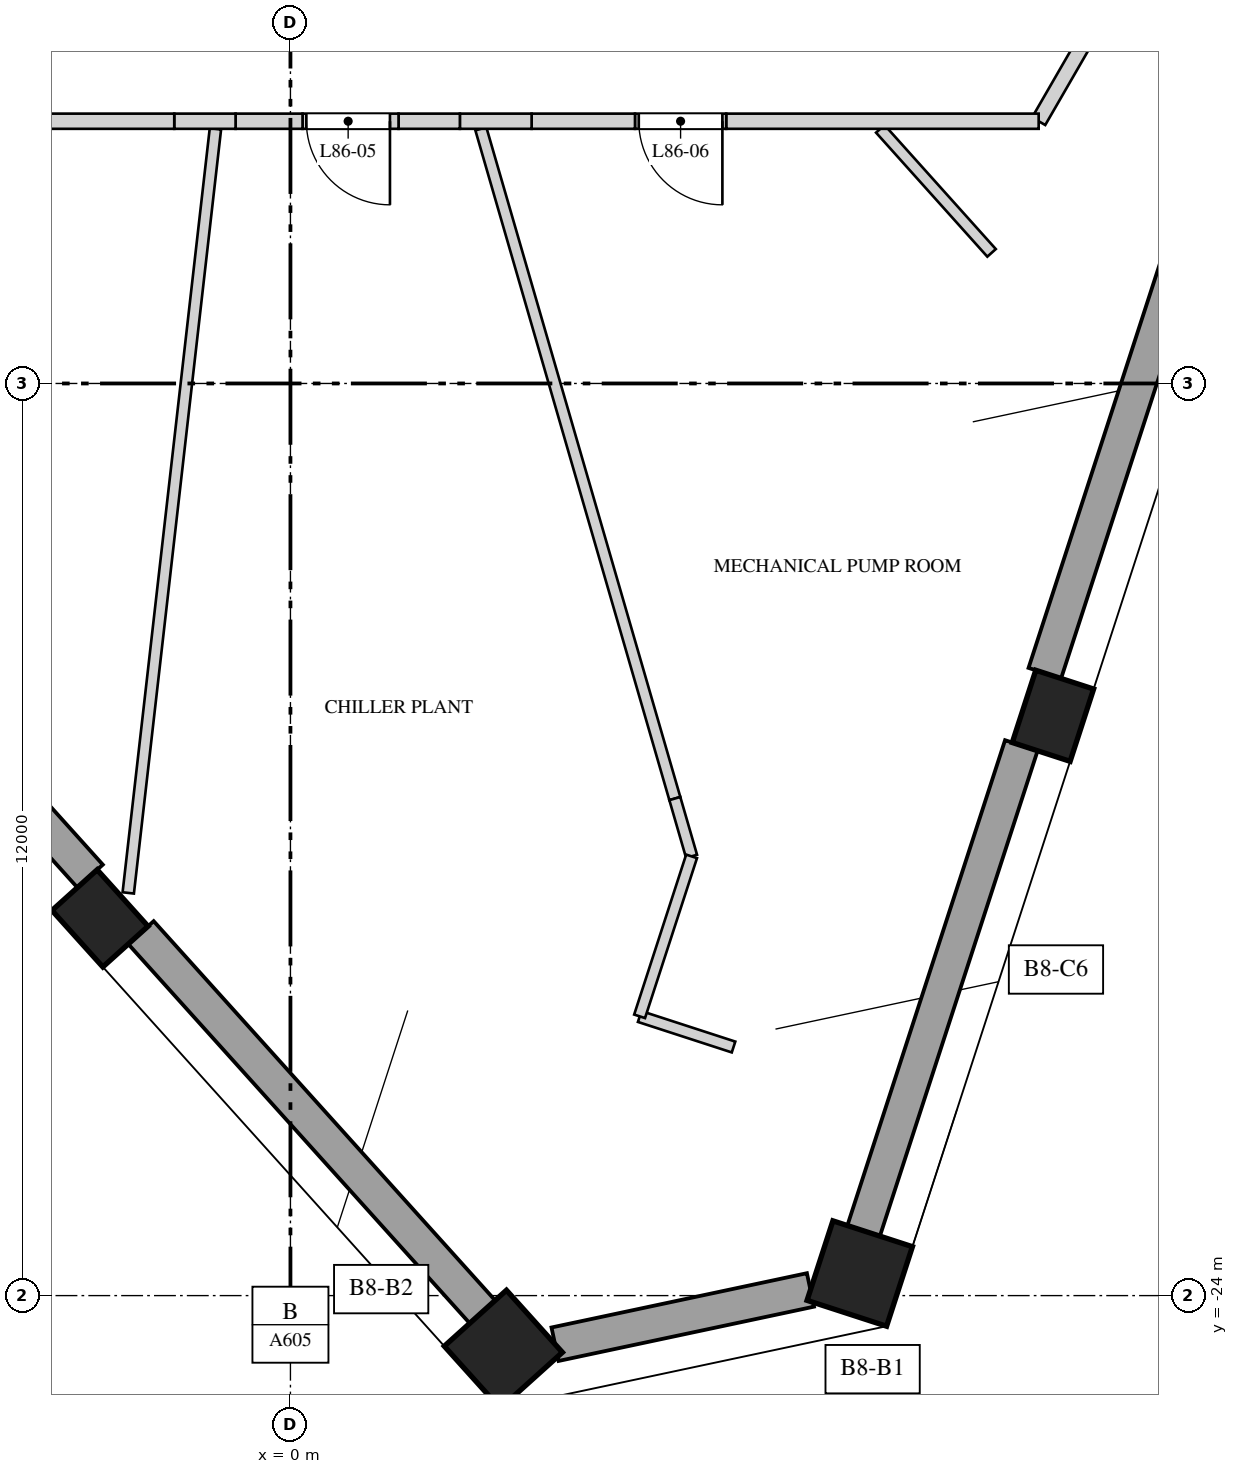
"""IFC4 building model, lengths in metres.
Left out: names, types, materials, properties, quantities, classifications, styles, units other than length and angle.
Written with IfcOpenShell. Run it as: python <this file> out.ifc"""

import sys

from ifc_helpers import new_model, si_unit, direction, frame, frame_2d, origin, origin_2d, place, context, subcontext, project, spatial, polyline, rectangle, outline, extrude, element, fill, save


model = new_model("IFC4")
c1 = context("Model", 3, precision=1e-05, world=origin(), true_north=direction((0.0, 1.0)))
c2 = subcontext(c1, "Body", "Model", "MODEL_VIEW")
j1 = project(units=[si_unit("LENGTHUNIT", "METRE"), si_unit("PLANEANGLEUNIT", "RADIAN")], contexts=[c1])
p1 = place(None, origin())
s1 = spatial("IfcSite", under=j1, at=p1, CompositionType="ELEMENT")
p2 = place(p1, origin())
s2 = spatial("IfcBuilding", under=s1, at=p2, CompositionType="ELEMENT")
p3 = place(p2, frame((0.0, 0.0, 374.9)))
s3 = spatial("IfcBuildingStorey", under=s2, at=p3, CompositionType="ELEMENT", Elevation=374.9)
p4 = place(p3, frame((-2.505, -19.037, 0.0), z_axis=(0.0, 0.0, 1.0), x_axis=(0.669130606359, -0.743144825477, 0.0)))
e1 = element("IfcColumn", 1, at=p4, inside=s3, PredefinedType="COLUMN", context=c2, shape_type="SweptSolid", body=[
    extrude(rectangle(XDim=1.0, YDim=0.8, at=origin_2d()), origin(), (0.0, 0.0, 1.0), 6.0),
])
for number, where, z_axis, x_axis in (
    (2, (2.801, -24.706, 0.0), (0.0, 0.0, 1.0), (0.669, -0.743, 0.0)),
    (3, (7.49, -23.709, 0.0), (0.0, 0.0, 1.0), (0.309, 0.951, 0.0)),
):
    element("IfcColumn", number, at=place(p3, frame(where, z_axis=z_axis, x_axis=x_axis)), inside=s3, PredefinedType="COLUMN", context=c2, shape_type="SweptSolid", body=[
        extrude(rectangle(XDim=1.1, YDim=1.1, at=origin_2d()), origin(), (0.0, 0.0, 1.0), 6.0),
    ])
p5 = place(p3, frame((10.032, -16.372, 0.0), z_axis=(0.0, 0.0, 1.0), x_axis=(0.309016994375, 0.951056516295, 0.0)))
e4 = element("IfcColumn", 4, at=p5, inside=s3, PredefinedType="COLUMN", context=c2, shape_type="SweptSolid", body=[
    extrude(rectangle(XDim=1.0, YDim=0.8, at=origin_2d()), origin(), (0.0, 0.0, 1.0), 6.0),
])
p6 = place(p3, frame((-7.53, -13.046, 0.0), z_axis=(0.0, 0.0, 1.0), x_axis=(0.669152823362, -0.743124820597, 0.0)))
e5 = element("IfcWall", 5, at=p6, inside=s3, PredefinedType="SOLIDWALL", context=c2, shape_type="SweptSolid", body=[
    extrude(rectangle(XDim=7.314, YDim=0.45, at=frame_2d((3.657, 0.0))), origin(), (0.0, 0.0, 1.0), 5.3),
])
p7 = place(p3, frame((-1.966, -19.224, 0.0), z_axis=(0.0, 0.0, 1.0), x_axis=(0.66911941145, -0.743154905266, 0.0)))
e6 = element("IfcWall", 6, at=p7, inside=s3, PredefinedType="SOLIDWALL", context=c2, shape_type="SweptSolid", body=[
    extrude(rectangle(XDim=6.714, YDim=0.45, at=frame_2d((3.357, 0.0))), origin(), (0.0, 0.0, 1.0), 5.3),
])
p8 = place(p3, frame((3.481, -24.64, 0.0), z_axis=(0.0, 0.0, 1.0), x_axis=(0.978139158523, 0.207951404333, 0.0)))
e7 = element("IfcWall", 7, at=p8, inside=s3, PredefinedType="SOLIDWALL", context=c2, shape_type="SweptSolid", body=[
    extrude(rectangle(XDim=3.435, YDim=0.45, at=frame_2d((1.718, 0.0))), origin(), (0.0, 0.0, 1.0), 5.3),
])
p9 = place(p3, frame((7.541, -23.148, 0.0), z_axis=(0.0, 0.0, 1.0), x_axis=(0.309018647645, 0.951055979114, 0.0)))
e8 = element("IfcWall", 8, at=p9, inside=s3, PredefinedType="SOLIDWALL", context=c2, shape_type="SweptSolid", body=[
    extrude(rectangle(XDim=6.714, YDim=0.45, at=frame_2d((3.357, 0.0))), origin(), (0.0, 0.0, 1.0), 5.3),
])
p10 = place(p3, frame((9.925, -15.812, 0.0), z_axis=(0.0, 0.0, 1.0), x_axis=(0.309008326872, 0.951059332494, 0.0)))
e9 = element("IfcWall", 9, at=p10, inside=s3, PredefinedType="SOLIDWALL", context=c2, shape_type="SweptSolid", body=[
    extrude(rectangle(XDim=7.314, YDim=0.45, at=frame_2d((3.657, 0.0))), origin(), (0.0, 0.0, 1.0), 5.3),
])
p11 = place(p3, frame((-0.987, -8.65, 0.0), z_axis=(0.0, 0.0, 1.0), x_axis=(-0.113368279169, -0.99355303496, 0.0)))
e10 = element("IfcWall", 10, at=p11, inside=s3, PredefinedType="PARTITIONING", context=c2, shape_type="SweptSolid", body=[
    extrude(rectangle(XDim=10.117, YDim=0.15, at=frame_2d((5.059, 0.0))), origin(), (0.0, 0.0, 1.0), 4.75),
])
p12 = place(p3, frame((2.505, -8.65, 0.0), z_axis=(0.0, 0.0, 1.0), x_axis=(0.278185386407, -0.960527402415, 0.0)))
e11 = element("IfcWall", 11, at=p12, inside=s3, PredefinedType="PARTITIONING", context=c2, shape_type="SweptSolid", body=[
    extrude(rectangle(XDim=9.173, YDim=0.15, at=frame_2d((4.586, 0.0))), origin(), (0.0, 0.0, 1.0), 4.55),
])
p13 = place(p3, frame((5.057, -17.461, 0.0), z_axis=(0.0, 0.0, 1.0), x_axis=(0.278222842465, -0.960516553699, 0.0)))
e12 = element("IfcWall", 12, at=p13, inside=s3, PredefinedType="PARTITIONING", context=c2, shape_type="SweptSolid", body=[
    extrude(rectangle(XDim=0.792, YDim=0.15, at=frame_2d((0.396, 0.0))), origin(), (0.0, 0.0, 1.0), 5.65),
])
p14 = place(p3, frame((4.595, -20.328, 0.0), z_axis=(0.0, 0.0, 1.0), x_axis=(0.951063088132, -0.308996767609, 0.0)))
e13 = element("IfcWall", 13, at=p14, inside=s3, PredefinedType="PARTITIONING", context=c2, shape_type="SweptSolid", body=[
    extrude(rectangle(XDim=1.298, YDim=0.15, at=frame_2d((0.649, 0.0))), origin(), (0.0, 0.0, 1.0), 5.65),
])
p15 = place(p3, frame((5.277, -18.221, 0.0), z_axis=(0.0, 0.0, 1.0), x_axis=(-0.309036176758, -0.951050283347, 0.0)))
e14 = element("IfcWall", 14, at=p15, inside=s3, PredefinedType="PARTITIONING", context=c2, shape_type="SweptSolid", body=[
    extrude(rectangle(XDim=2.213, YDim=0.15, at=frame_2d((1.106, 0.0))), origin(), (0.0, 0.0, 1.0), 5.65),
])
p16 = place(p3, frame((7.76, -8.65, 0.0), z_axis=(0.0, 0.0, 1.0), x_axis=(0.667813245051, -0.744328872028, 0.0)))
e15 = element("IfcWall", 15, at=p16, inside=s3, PredefinedType="PARTITIONING", context=c2, shape_type="SweptSolid", body=[
    extrude(rectangle(XDim=2.192, YDim=0.15, at=frame_2d((1.096, 0.0))), origin(), (0.0, 0.0, 1.0), 5.65),
])
p17 = place(p3, frame((10.474, -7.458, 0.0), z_axis=(0.0, 0.0, 1.0), x_axis=(-0.499929168788, -0.866066294342, 0.0)))
e16 = element("IfcWall", 16, at=p17, inside=s3, PredefinedType="SOLIDWALL", context=c2, shape_type="SweptSolid", body=[
    extrude(rectangle(XDim=1.261, YDim=0.2, at=frame_2d((0.63, 0.0))), origin(), (0.0, 0.0, 1.0), 5.65),
])
p18 = place(p3, frame((9.844, -8.55, 0.0), z_axis=(0.0, 0.0, 1.0), x_axis=(-1.0, 0.0, 0.0)))
e17 = element("IfcWall", 17, at=p18, inside=s3, PredefinedType="SOLIDWALL", context=c2, shape_type="SweptSolid", body=[
    extrude(rectangle(XDim=4.111, YDim=0.2, at=frame_2d((2.055, 0.0))), origin(), (0.0, 0.0, 1.0), 5.65),
])
p19 = place(p3, frame((5.733, -8.55, 0.0), z_axis=(0.0, 0.0, 1.0), x_axis=(-1.0, 0.0, 0.0)))
e18 = element("IfcWall", 18, at=p19, inside=s3, PredefinedType="SOLIDWALL", context=c2, shape_type="SweptSolid", body=[
    extrude(outline(polyline([(0.0, 0.0), (1.2, 0.0), (1.2, 5.65), (0.905, 5.65), (0.905, 4.95), (0.0, 4.95), (0.0, 0.0)])), frame((0.0, 0.1, 0.0), z_axis=(0.0, -1.0, 0.0), x_axis=(1.0, 0.0, 0.0)), (0.0, 0.0, 1.0), 0.2),
])
p20 = place(p19, frame((0.05, 0.0, 0.0)))
e19 = element("IfcOpeningElement", 19, at=p20, cuts=e18, PredefinedType="OPENING", context=c2, shape_type="SweptSolid", body=[
    extrude(rectangle(XDim=1.1, YDim=2.4, at=frame_2d((0.55, 1.2))), frame((0.0, 0.11, 0.0), z_axis=(0.0, -1.0, 0.0), x_axis=(1.0, 0.0, 0.0)), (0.0, 0.0, 1.0), 0.22),
])
p21 = place(p3, frame((4.533, -8.55, 0.0), z_axis=(0.0, 0.0, 1.0), x_axis=(-1.0, 0.0, 0.0)))
e20 = element("IfcWall", 20, at=p21, inside=s3, PredefinedType="SOLIDWALL", context=c2, shape_type="SweptSolid", body=[
    extrude(rectangle(XDim=1.36, YDim=0.2, at=frame_2d((0.68, 0.0))), origin(), (0.0, 0.0, 1.0), 5.65),
])
p22 = place(p3, frame((3.173, -8.55, 0.0), z_axis=(0.0, 0.0, 1.0), x_axis=(-1.0, 0.0, 0.0)))
e21 = element("IfcWall", 21, at=p22, inside=s3, PredefinedType="SOLIDWALL", context=c2, shape_type="SweptSolid", body=[
    extrude(rectangle(XDim=0.944, YDim=0.2, at=frame_2d((0.472, 0.0))), origin(), (0.0, 0.0, 1.0), 4.55),
])
p23 = place(p3, frame((2.229, -8.55, 0.0), z_axis=(0.0, 0.0, 1.0), x_axis=(-1.0, 0.0, 0.0)))
e22 = element("IfcWall", 22, at=p23, inside=s3, PredefinedType="SOLIDWALL", context=c2, shape_type="SweptSolid", body=[
    extrude(rectangle(XDim=0.807, YDim=0.2, at=frame_2d((0.403, 0.0))), origin(), (0.0, 0.0, 1.0), 5.65),
])
p24 = place(p3, frame((1.422, -8.55, 0.0), z_axis=(0.0, 0.0, 1.0), x_axis=(-1.0, 0.0, 0.0)))
e23 = element("IfcWall", 23, at=p24, inside=s3, PredefinedType="SOLIDWALL", context=c2, shape_type="SweptSolid", body=[
    extrude(outline(polyline([(0.0, 0.0), (1.263, 0.0), (1.263, 5.65), (0.906, 5.65), (0.906, 4.55), (0.0, 4.55), (0.0, 0.0)])), frame((0.0, 0.1, 0.0), z_axis=(0.0, -1.0, 0.0), x_axis=(1.0, 0.0, 0.0)), (0.0, 0.0, 1.0), 0.2),
])
p25 = place(p24, frame((0.113, 0.0, 0.0)))
e24 = element("IfcOpeningElement", 24, at=p25, cuts=e23, PredefinedType="OPENING", context=c2, shape_type="SweptSolid", body=[
    extrude(rectangle(XDim=1.1, YDim=2.4, at=frame_2d((0.55, 1.2))), frame((0.0, 0.11, 0.0), z_axis=(0.0, -1.0, 0.0), x_axis=(1.0, 0.0, 0.0)), (0.0, 0.0, 1.0), 0.22),
])
p26 = place(p3, frame((0.159, -8.55, 0.0), z_axis=(0.0, 0.0, 1.0), x_axis=(-1.0, 0.0, 0.0)))
e25 = element("IfcWall", 25, at=p26, inside=s3, PredefinedType="SOLIDWALL", context=c2, shape_type="SweptSolid", body=[
    extrude(rectangle(XDim=0.881, YDim=0.2, at=frame_2d((0.44, 0.0))), origin(), (0.0, 0.0, 1.0), 5.65),
])
p27 = place(p3, frame((-0.722, -8.55, 0.0), z_axis=(0.0, 0.0, 1.0), x_axis=(-1.0, 0.0, 0.0)))
e26 = element("IfcWall", 26, at=p27, inside=s3, PredefinedType="SOLIDWALL", context=c2, shape_type="SweptSolid", body=[
    extrude(rectangle(XDim=0.807, YDim=0.2, at=frame_2d((0.403, 0.0))), origin(), (0.0, 0.0, 1.0), 4.75),
])
p28 = place(p3, frame((-1.529, -8.55, 0.0), z_axis=(0.0, 0.0, 1.0), x_axis=(-1.0, 0.0, 0.0)))
e27 = element("IfcWall", 27, at=p28, inside=s3, PredefinedType="SOLIDWALL", context=c2, shape_type="SweptSolid", body=[
    extrude(rectangle(XDim=3.206, YDim=0.2, at=frame_2d((1.603, 0.0))), origin(), (0.0, 0.0, 1.0), 5.65),
])
p29 = place(p25, origin())
e28 = element("IfcDoor", 28, at=p29, inside=s3, OperationType="SINGLE_SWING_RIGHT", PredefinedType="DOOR", context=c2, shape_type="SweptSolid", body=[
    extrude(rectangle(XDim=1.1, YDim=2.4, at=frame_2d((0.55, 1.2))), frame((0.0, 0.025, 0.0), z_axis=(0.0, -1.0, 0.0), x_axis=(1.0, 0.0, 0.0)), (0.0, 0.0, 1.0), 0.05),
])
fill(e24, e28)
p30 = place(p20, origin())
e29 = element("IfcDoor", 29, at=p30, inside=s3, OperationType="SINGLE_SWING_LEFT", PredefinedType="DOOR", context=c2, shape_type="SweptSolid", body=[
    extrude(rectangle(XDim=1.1, YDim=2.4, at=frame_2d((0.55, 1.2))), frame((0.0, 0.025, 0.0), z_axis=(0.0, -1.0, 0.0), x_axis=(1.0, 0.0, 0.0)), (0.0, 0.0, 1.0), 0.05),
])
fill(e19, e29)
save(model, sys.argv[1])
